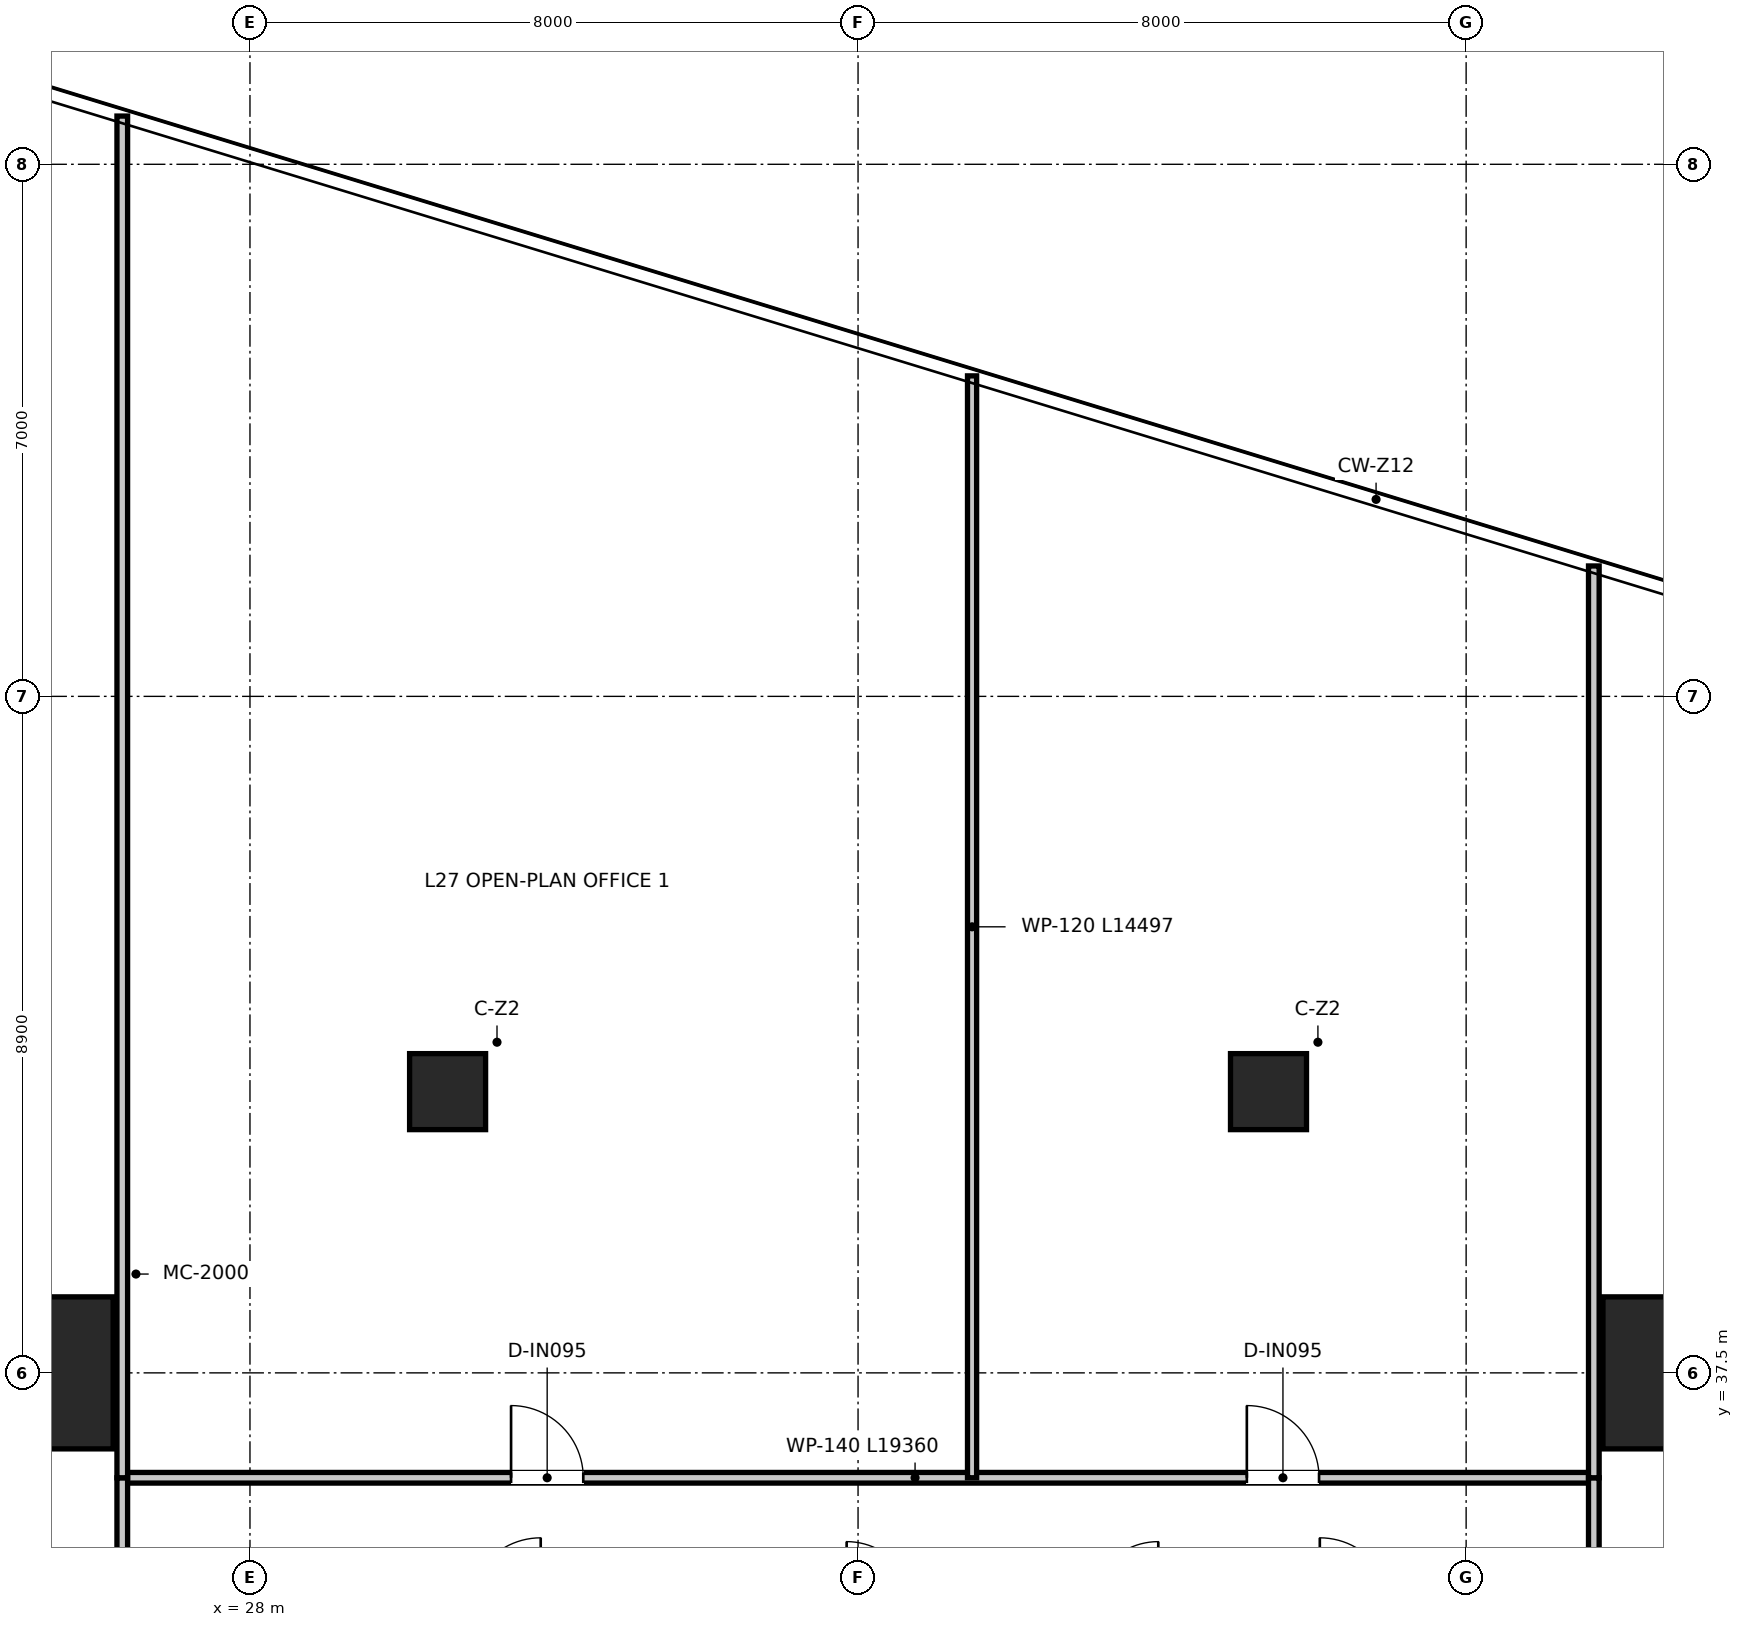
"""IFC4 building model, lengths in metres.
Left out: names, types, materials, properties, quantities, classifications, styles, units other than length and angle.
Written with IfcOpenShell. Run it as: python <this file> out.ifc"""

import sys

from ifc_helpers import new_model, si_unit, direction, frame, frame_2d, origin, origin_2d, place, context, subcontext, project, spatial, rectangle, extrude, source, transform, mapped, element, fill, save


model = new_model("IFC4")
c1 = context("Model", 3, precision=1e-05, world=origin(), true_north=direction((0.0, 1.0)))
c2 = subcontext(c1, "Body", "Model", "MODEL_VIEW")
j1 = project(units=[si_unit("LENGTHUNIT", "METRE"), si_unit("PLANEANGLEUNIT", "RADIAN")], contexts=[c1])
p1 = place(None, origin())
s1 = spatial("IfcSite", under=j1, at=p1, CompositionType="ELEMENT")
p2 = place(p1, origin())
s2 = spatial("IfcBuilding", under=s1, at=p2, CompositionType="ELEMENT")
p3 = place(p2, frame((0.0, 0.0, 113.75)))
s3 = spatial("IfcBuildingStorey", under=s2, at=p3, CompositionType="ELEMENT", Elevation=113.75)
m1 = source(origin(), c2, "Body", "SweptSolid", [
    extrude(rectangle(XDim=2.0, YDim=2.0, at=origin_2d()), origin(), (0.0, 0.0, 1.0), 3.95),
])
for number, where, z_axis, x_axis in (
    (1, (46.8, 37.5, 0.0), (0.0, 0.0, 1.0), (1.0, 0.0, 0.0)),
    (2, (25.2, 37.5, 0.0), (0.0, 0.0, 1.0), (1.0, 0.0, 0.0)),
):
    element("IfcColumn", number, at=place(p3, frame(where, z_axis=z_axis, x_axis=x_axis)), inside=s3, PredefinedType="USERDEFINED", context=c2, shape_type="MappedRepresentation", body=[
        mapped(m1, transform((0.0, 0.0, 0.0), x_axis=(1.0, 0.0, 0.0), y_axis=(0.0, 1.0, 0.0), z_axis=(0.0, 0.0, 1.0), scale=1.0)),
    ])
m2 = source(origin(), c2, "Body", "SweptSolid", [
    extrude(rectangle(XDim=1.0, YDim=1.0, at=origin_2d()), origin(), (0.0, 0.0, 1.0), 3.95),
])
for number, where, z_axis, x_axis in (
    (3, (30.6, 41.2, 0.0), (0.0, 0.0, 1.0), (1.0, 0.0, 0.0)),
    (4, (41.4, 41.2, 0.0), (0.0, 0.0, 1.0), (1.0, 0.0, 0.0)),
):
    element("IfcColumn", number, at=place(p3, frame(where, z_axis=z_axis, x_axis=x_axis)), inside=s3, PredefinedType="COLUMN", context=c2, shape_type="MappedRepresentation", body=[
        mapped(m2, transform((0.0, 0.0, 0.0), x_axis=(1.0, 0.0, 0.0), y_axis=(0.0, 1.0, 0.0), z_axis=(0.0, 0.0, 1.0), scale=1.0)),
    ])
p4 = place(p3, frame((26.32, 36.12, 0.0), z_axis=(0.0, 0.0, 1.0), x_axis=(1.0, 0.0, 0.0)))
e5 = element("IfcWall", 5, at=p4, inside=s3, PredefinedType="PARTITIONING", context=c2, shape_type="SweptSolid", body=[
    extrude(rectangle(XDim=19.36, YDim=0.14, at=frame_2d((9.68, 0.0))), origin(), (0.0, 0.0, 1.0), 3.08),
])
p5 = place(p4, frame((5.115, 0.0, 0.0)))
e6 = element("IfcOpeningElement", 6, at=p5, cuts=e5, PredefinedType="OPENING", context=c2, shape_type="SweptSolid", body=[
    extrude(rectangle(XDim=0.95, YDim=2.1, at=frame_2d((0.475, 1.05))), frame((0.0, 0.08, 0.0), z_axis=(0.0, -1.0, 0.0), x_axis=(1.0, 0.0, 0.0)), (0.0, 0.0, 1.0), 0.16),
])
p6 = place(p4, frame((14.795, 0.0, 0.0)))
e7 = element("IfcOpeningElement", 7, at=p6, cuts=e5, PredefinedType="OPENING", context=c2, shape_type="SweptSolid", body=[
    extrude(rectangle(XDim=0.95, YDim=2.1, at=frame_2d((0.475, 1.05))), frame((0.0, 0.08, 0.0), z_axis=(0.0, -1.0, 0.0), x_axis=(1.0, 0.0, 0.0)), (0.0, 0.0, 1.0), 0.16),
])
p7 = place(p3, frame((26.32, 10.5, 0.0), z_axis=(0.0, 0.0, 1.0), x_axis=(0.0, 1.0, 0.0)))
e8 = element("IfcWall", 8, at=p7, inside=s3, PredefinedType="PARTITIONING", context=c2, shape_type="SweptSolid", body=[
    extrude(rectangle(XDim=25.62, YDim=0.14, at=frame_2d((12.81, 0.0))), origin(), (0.0, 0.0, 1.0), 2.97),
])
p8 = place(p7, frame((8.275, 0.0, 0.0)))
e9 = element("IfcOpeningElement", 9, at=p8, cuts=e8, PredefinedType="OPENING", context=c2, shape_type="SweptSolid", body=[
    extrude(rectangle(XDim=0.95, YDim=2.1, at=frame_2d((0.475, 1.05))), frame((0.0, 0.08, 0.0), z_axis=(0.0, -1.0, 0.0), x_axis=(1.0, 0.0, 0.0)), (0.0, 0.0, 1.0), 0.16),
])
p9 = place(p7, frame((12.775, 0.0, 0.0)))
e10 = element("IfcOpeningElement", 10, at=p9, cuts=e8, PredefinedType="OPENING", context=c2, shape_type="SweptSolid", body=[
    extrude(rectangle(XDim=0.95, YDim=2.1, at=frame_2d((0.475, 1.05))), frame((0.0, 0.08, 0.0), z_axis=(0.0, -1.0, 0.0), x_axis=(1.0, 0.0, 0.0)), (0.0, 0.0, 1.0), 0.16),
])
p10 = place(p7, frame((18.275, 0.0, 0.0)))
e11 = element("IfcOpeningElement", 11, at=p10, cuts=e8, PredefinedType="OPENING", context=c2, shape_type="SweptSolid", body=[
    extrude(rectangle(XDim=0.95, YDim=2.1, at=frame_2d((0.475, 1.05))), frame((0.0, 0.08, 0.0), z_axis=(0.0, -1.0, 0.0), x_axis=(1.0, 0.0, 0.0)), (0.0, 0.0, 1.0), 0.16),
])
p11 = place(p7, frame((22.375, 0.0, 0.0)))
e12 = element("IfcOpeningElement", 12, at=p11, cuts=e8, PredefinedType="OPENING", context=c2, shape_type="SweptSolid", body=[
    extrude(rectangle(XDim=0.95, YDim=2.1, at=frame_2d((0.475, 1.05))), frame((0.0, 0.08, 0.0), z_axis=(0.0, -1.0, 0.0), x_axis=(1.0, 0.0, 0.0)), (0.0, 0.0, 1.0), 0.16),
])
p12 = place(p3, frame((45.68, 10.5, 0.0), z_axis=(0.0, 0.0, 1.0), x_axis=(0.0, 1.0, 0.0)))
e13 = element("IfcWall", 13, at=p12, inside=s3, PredefinedType="PARTITIONING", context=c2, shape_type="SweptSolid", body=[
    extrude(rectangle(XDim=25.62, YDim=0.14, at=frame_2d((12.81, 0.0))), origin(), (0.0, 0.0, 1.0), 2.97),
])
p13 = place(p12, frame((8.275, 0.0, 0.0)))
e14 = element("IfcOpeningElement", 14, at=p13, cuts=e13, PredefinedType="OPENING", context=c2, shape_type="SweptSolid", body=[
    extrude(rectangle(XDim=0.95, YDim=2.1, at=frame_2d((0.475, 1.05))), frame((0.0, 0.08, 0.0), z_axis=(0.0, -1.0, 0.0), x_axis=(1.0, 0.0, 0.0)), (0.0, 0.0, 1.0), 0.16),
])
p14 = place(p12, frame((12.775, 0.0, 0.0)))
e15 = element("IfcOpeningElement", 15, at=p14, cuts=e13, PredefinedType="OPENING", context=c2, shape_type="SweptSolid", body=[
    extrude(rectangle(XDim=0.95, YDim=2.1, at=frame_2d((0.475, 1.05))), frame((0.0, 0.08, 0.0), z_axis=(0.0, -1.0, 0.0), x_axis=(1.0, 0.0, 0.0)), (0.0, 0.0, 1.0), 0.16),
])
p15 = place(p12, frame((18.275, 0.0, 0.0)))
e16 = element("IfcOpeningElement", 16, at=p15, cuts=e13, PredefinedType="OPENING", context=c2, shape_type="SweptSolid", body=[
    extrude(rectangle(XDim=0.95, YDim=2.1, at=frame_2d((0.475, 1.05))), frame((0.0, 0.08, 0.0), z_axis=(0.0, -1.0, 0.0), x_axis=(1.0, 0.0, 0.0)), (0.0, 0.0, 1.0), 0.16),
])
p16 = place(p12, frame((22.375, 0.0, 0.0)))
e17 = element("IfcOpeningElement", 17, at=p16, cuts=e13, PredefinedType="OPENING", context=c2, shape_type="SweptSolid", body=[
    extrude(rectangle(XDim=0.95, YDim=2.1, at=frame_2d((0.475, 1.05))), frame((0.0, 0.08, 0.0), z_axis=(0.0, -1.0, 0.0), x_axis=(1.0, 0.0, 0.0)), (0.0, 0.0, 1.0), 0.16),
])
p17 = place(p3, frame((26.32, 36.12, 0.0), z_axis=(0.0, 0.0, 1.0), x_axis=(0.0, 1.0, 0.0)))
e18 = element("IfcWall", 18, at=p17, inside=s3, PredefinedType="PARTITIONING", context=c2, shape_type="SweptSolid", body=[
    extrude(rectangle(XDim=17.914, YDim=0.14, at=frame_2d((8.957, 0.0))), origin(), (0.0, 0.0, 1.0), 2.97),
])
p18 = place(p3, frame((45.68, 36.12, 0.0), z_axis=(0.0, 0.0, 1.0), x_axis=(0.0, 1.0, 0.0)))
e19 = element("IfcWall", 19, at=p18, inside=s3, PredefinedType="PARTITIONING", context=c2, shape_type="SweptSolid", body=[
    extrude(rectangle(XDim=11.995, YDim=0.14, at=frame_2d((5.998, 0.0))), origin(), (0.0, 0.0, 1.0), 2.97),
])
p19 = place(p3, frame((37.5, 36.12, 0.0), z_axis=(0.0, 0.0, 1.0), x_axis=(0.0, 1.0, 0.0)))
e20 = element("IfcWall", 20, at=p19, inside=s3, PredefinedType="PARTITIONING", context=c2, shape_type="SweptSolid", body=[
    extrude(rectangle(XDim=14.496, YDim=0.12, at=frame_2d((7.248, 0.0))), origin(), (0.0, 0.0, 1.0), 2.97),
])
p20 = place(p5, origin())
e21 = element("IfcDoor", 21, at=p20, inside=s3, OperationType="SINGLE_SWING_LEFT", PredefinedType="DOOR", context=c2, shape_type="SweptSolid", body=[
    extrude(rectangle(XDim=0.95, YDim=2.1, at=frame_2d((0.475, 1.05))), frame((0.0, 0.025, 0.0), z_axis=(0.0, -1.0, 0.0), x_axis=(1.0, 0.0, 0.0)), (0.0, 0.0, 1.0), 0.05),
])
fill(e6, e21)
p21 = place(p6, origin())
e22 = element("IfcDoor", 22, at=p21, inside=s3, OperationType="SINGLE_SWING_LEFT", PredefinedType="DOOR", context=c2, shape_type="SweptSolid", body=[
    extrude(rectangle(XDim=0.95, YDim=2.1, at=frame_2d((0.475, 1.05))), frame((0.0, 0.025, 0.0), z_axis=(0.0, -1.0, 0.0), x_axis=(1.0, 0.0, 0.0)), (0.0, 0.0, 1.0), 0.05),
])
fill(e7, e22)
save(model, sys.argv[1])
